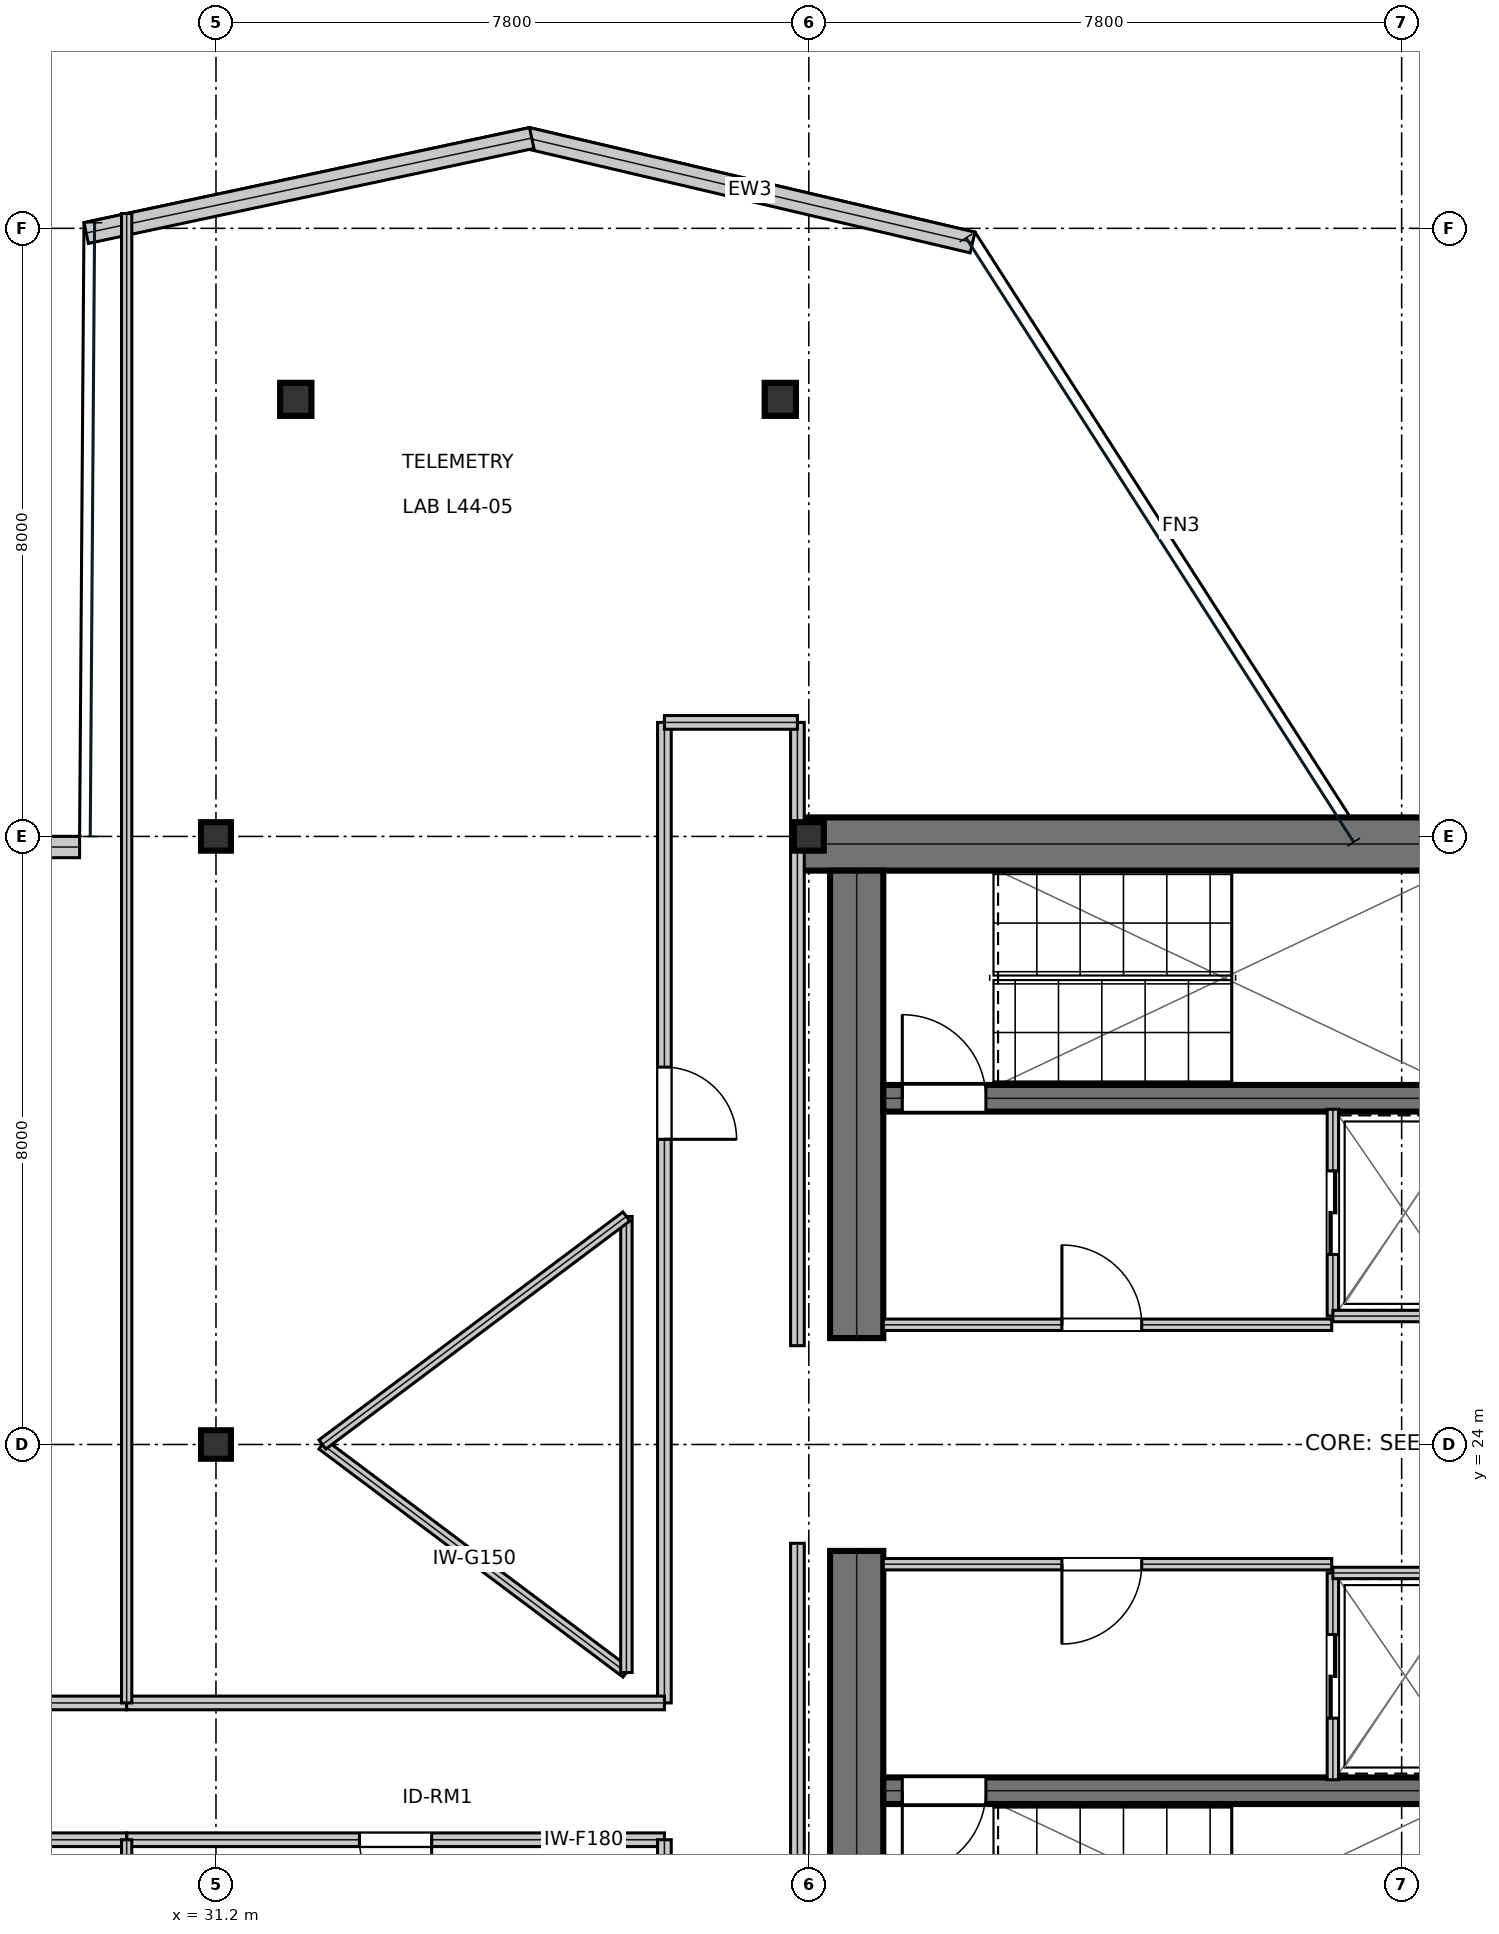
"""IFC4 building model, lengths in metres.
Left out: names, types, materials, properties, quantities, classifications, styles, units other than length and angle.
Written with IfcOpenShell. Run it as: python <this file> out.ifc"""

import sys

from ifc_helpers import new_model, si_unit, direction, frame, frame_2d, origin, origin_2d, place, context, subcontext, project, spatial, rectangle, i_section, extrude, element, fill, save


model = new_model("IFC4")
c1 = context("Model", 3, precision=1e-05, world=origin(), true_north=direction((0.0, 1.0)))
c2 = subcontext(c1, "Body", "Model", "MODEL_VIEW")
j1 = project(units=[si_unit("LENGTHUNIT", "METRE"), si_unit("PLANEANGLEUNIT", "RADIAN")], contexts=[c1])
p1 = place(None, origin())
s1 = spatial("IfcSite", under=j1, at=p1, CompositionType="ELEMENT")
p2 = place(p1, origin())
s2 = spatial("IfcBuilding", under=s1, at=p2, CompositionType="ELEMENT")
p3 = place(p2, frame((0.0, 0.0, 191.85)))
s3 = spatial("IfcBuildingStorey", under=s2, at=p3, CompositionType="ELEMENT", Elevation=191.85)
p4 = place(p3, frame((38.8, 31.9, 0.0), z_axis=(0.0, 0.0, 1.0), x_axis=(1.0, 0.0, 0.0)))
e1 = element("IfcWall", 1, at=p4, inside=s3, PredefinedType="SHEAR", context=c2, shape_type="SweptSolid", body=[
    extrude(rectangle(XDim=16.0, YDim=0.7, at=frame_2d((8.0, 0.0))), origin(), (0.0, 0.0, 1.0), 3.79),
])
for number, where, z_axis, x_axis in (
    (2, (39.63, 16.45, 0.0), (0.0, 0.0, 1.0), (0.0, 1.0, 0.0)),
    (3, (39.63, 25.4, 0.0), (0.0, 0.0, 1.0), (0.0, 1.0, 0.0)),
):
    element("IfcWall", number, at=place(p3, frame(where, z_axis=z_axis, x_axis=x_axis)), inside=s3, PredefinedType="SHEAR", context=c2, shape_type="SweptSolid", body=[
        extrude(rectangle(XDim=6.15, YDim=0.7, at=frame_2d((3.075, 0.0))), origin(), (0.0, 0.0, 1.0), 3.79),
    ])
p5 = place(p3, frame((39.98, 28.555, 0.0), z_axis=(0.0, 0.0, 1.0), x_axis=(1.0, 0.0, 0.0)))
e4 = element("IfcWall", 4, at=p5, inside=s3, PredefinedType="SHEAR", context=c2, shape_type="SweptSolid", body=[
    extrude(rectangle(XDim=7.71, YDim=0.35, at=frame_2d((3.855, 0.0))), origin(), (0.0, 0.0, 1.0), 3.79),
])
p6 = place(p5, frame((0.25, 0.0, 0.0)))
e5 = element("IfcOpeningElement", 5, at=p6, cuts=e4, PredefinedType="OPENING", context=c2, shape_type="SweptSolid", body=[
    extrude(rectangle(XDim=1.1, YDim=2.15, at=frame_2d((0.55, 1.075))), frame((0.0, 0.185, 0.0), z_axis=(0.0, -1.0, 0.0), x_axis=(1.0, 0.0, 0.0)), (0.0, 0.0, 1.0), 0.37),
])
p7 = place(p3, frame((39.98, 19.445, 0.0), z_axis=(0.0, 0.0, 1.0), x_axis=(1.0, 0.0, 0.0)))
e6 = element("IfcWall", 6, at=p7, inside=s3, PredefinedType="SHEAR", context=c2, shape_type="SweptSolid", body=[
    extrude(rectangle(XDim=7.71, YDim=0.35, at=frame_2d((3.855, 0.0))), origin(), (0.0, 0.0, 1.0), 3.79),
])
p8 = place(p7, frame((0.25, 0.0, 0.0)))
e7 = element("IfcOpeningElement", 7, at=p8, cuts=e6, PredefinedType="OPENING", context=c2, shape_type="SweptSolid", body=[
    extrude(rectangle(XDim=1.1, YDim=2.15, at=frame_2d((0.55, 1.075))), frame((0.0, 0.185, 0.0), z_axis=(0.0, -1.0, 0.0), x_axis=(1.0, 0.0, 0.0)), (0.0, 0.0, 1.0), 0.37),
])
for number, where, z_axis, x_axis in (
    (8, (31.2, 24.0, 0.0), (0.0, 0.0, 1.0), (1.0, 0.0, 0.0)),
    (9, (31.2, 32.0, 0.0), (0.0, 0.0, 1.0), (1.0, 0.0, 0.0)),
    (10, (39.0, 32.0, 0.0), (0.0, 0.0, 1.0), (1.0, 0.0, 0.0)),
):
    element("IfcColumn", number, at=place(p3, frame(where, z_axis=z_axis, x_axis=x_axis)), inside=s3, PredefinedType="COLUMN", context=c2, shape_type="SweptSolid", body=[
        extrude(i_section(OverallWidth=0.394, OverallDepth=0.375, WebThickness=0.017, FlangeThickness=0.028, at=origin_2d()), origin(), (0.0, 0.0, 1.0), 4.044),
    ])
for number, where, z_axis, x_axis in (
    (11, (32.25, 37.75, 0.016), (0.0, 0.0, 1.0), (1.0, 0.0, 0.0)),
    (12, (38.625, 37.75, 0.016), (0.0, 0.0, 1.0), (1.0, 0.0, 0.0)),
):
    element("IfcColumn", number, at=place(p3, frame(where, z_axis=z_axis, x_axis=x_axis)), inside=s3, PredefinedType="COLUMN", context=c2, shape_type="SweptSolid", body=[
        extrude(i_section(OverallWidth=0.412, OverallDepth=0.435, WebThickness=0.036, FlangeThickness=0.058, at=origin_2d()), origin(), (0.0, 0.0, 1.0), 4.018),
    ])
p9 = place(p3, frame((41.155, 39.814, 0.0), z_axis=(0.0, 0.0, 1.0), x_axis=(-0.973574347184, 0.228370292517, 0.0)))
e13 = element("IfcWall", 13, at=p9, inside=s3, PredefinedType="STANDARD", context=c2, shape_type="SweptSolid", body=[
    extrude(rectangle(XDim=6.021, YDim=0.28, at=frame_2d((3.01, 0.0))), origin(), (0.0, 0.0, 1.0), 3.79),
])
p10 = place(p3, frame((35.354, 41.188, 0.0), z_axis=(0.0, 0.0, 1.0), x_axis=(-0.978010564176, -0.208555355626, 0.0)))
e14 = element("IfcWall", 14, at=p10, inside=s3, PredefinedType="STANDARD", context=c2, shape_type="SweptSolid", body=[
    extrude(rectangle(XDim=5.994, YDim=0.28, at=frame_2d((2.997, 0.0))), origin(), (0.0, 0.0, 1.0), 3.79),
])
p11 = place(p3, frame((29.406, 31.86, 0.0), z_axis=(0.0, 0.0, 1.0), x_axis=(-1.0, 0.0, 0.0)))
e15 = element("IfcWall", 15, at=p11, inside=s3, PredefinedType="STANDARD", context=c2, shape_type="SweptSolid", body=[
    extrude(rectangle(XDim=2.806, YDim=0.28, at=frame_2d((1.403, 0.0))), origin(), (0.0, 0.0, 1.0), 3.79),
])
p12 = place(p3, frame((39.98, 25.575, 0.0), z_axis=(0.0, 0.0, 1.0), x_axis=(1.0, 0.0, 0.0)))
e16 = element("IfcWall", 16, at=p12, inside=s3, PredefinedType="PARTITIONING", context=c2, shape_type="SweptSolid", body=[
    extrude(rectangle(XDim=5.9, YDim=0.15, at=frame_2d((2.95, 0.0))), origin(), (0.0, 0.0, 1.0), 3.79),
])
p13 = place(p12, frame((2.35, 0.0, 0.0)))
e17 = element("IfcOpeningElement", 17, at=p13, cuts=e16, PredefinedType="OPENING", context=c2, shape_type="SweptSolid", body=[
    extrude(rectangle(XDim=1.05, YDim=2.15, at=frame_2d((0.525, 1.075))), frame((0.0, 0.085, 0.0), z_axis=(0.0, -1.0, 0.0), x_axis=(1.0, 0.0, 0.0)), (0.0, 0.0, 1.0), 0.17),
])
p14 = place(p3, frame((39.98, 22.425, 0.0), z_axis=(0.0, 0.0, 1.0), x_axis=(1.0, 0.0, 0.0)))
e18 = element("IfcWall", 18, at=p14, inside=s3, PredefinedType="PARTITIONING", context=c2, shape_type="SweptSolid", body=[
    extrude(rectangle(XDim=5.9, YDim=0.15, at=frame_2d((2.95, 0.0))), origin(), (0.0, 0.0, 1.0), 3.79),
])
p15 = place(p14, frame((2.35, 0.0, 0.0)))
e19 = element("IfcOpeningElement", 19, at=p15, cuts=e18, PredefinedType="OPENING", context=c2, shape_type="SweptSolid", body=[
    extrude(rectangle(XDim=1.05, YDim=2.15, at=frame_2d((0.525, 1.075))), frame((0.0, 0.085, 0.0), z_axis=(0.0, -1.0, 0.0), x_axis=(1.0, 0.0, 0.0)), (0.0, 0.0, 1.0), 0.17),
])
p16 = place(p3, frame((45.895, 25.69, 0.0), z_axis=(0.0, 0.0, 1.0), x_axis=(0.0, 1.0, 0.0)))
e20 = element("IfcWall", 20, at=p16, inside=s3, PredefinedType="PARTITIONING", context=c2, shape_type="SweptSolid", body=[
    extrude(rectangle(XDim=2.72, YDim=0.15, at=frame_2d((1.36, 0.0))), origin(), (0.0, 0.0, 1.0), 3.79),
])
p17 = place(p16, frame((0.81, 0.0, 0.0)))
e21 = element("IfcOpeningElement", 21, at=p17, cuts=e20, PredefinedType="OPENING", context=c2, shape_type="SweptSolid", body=[
    extrude(rectangle(XDim=1.1, YDim=2.15, at=frame_2d((0.55, 1.075))), frame((0.0, 0.085, 0.0), z_axis=(0.0, -1.0, 0.0), x_axis=(1.0, 0.0, 0.0)), (0.0, 0.0, 1.0), 0.17),
])
p18 = place(p3, frame((45.895, 25.69, 0.0), z_axis=(0.0, 0.0, 1.0), x_axis=(1.0, 0.0, 0.0)))
e22 = element("IfcWall", 22, at=p18, inside=s3, PredefinedType="PARTITIONING", context=c2, shape_type="SweptSolid", body=[
    extrude(rectangle(XDim=1.915, YDim=0.15, at=frame_2d((0.958, 0.0))), origin(), (0.0, 0.0, 1.0), 3.79),
])
p19 = place(p3, frame((45.895, 19.59, 0.0), z_axis=(0.0, 0.0, 1.0), x_axis=(0.0, 1.0, 0.0)))
e23 = element("IfcWall", 23, at=p19, inside=s3, PredefinedType="PARTITIONING", context=c2, shape_type="SweptSolid", body=[
    extrude(rectangle(XDim=2.72, YDim=0.15, at=frame_2d((1.36, 0.0))), origin(), (0.0, 0.0, 1.0), 3.79),
])
p20 = place(p19, frame((0.81, 0.0, 0.0)))
e24 = element("IfcOpeningElement", 24, at=p20, cuts=e23, PredefinedType="OPENING", context=c2, shape_type="SweptSolid", body=[
    extrude(rectangle(XDim=1.1, YDim=2.15, at=frame_2d((0.55, 1.075))), frame((0.0, 0.085, 0.0), z_axis=(0.0, -1.0, 0.0), x_axis=(1.0, 0.0, 0.0)), (0.0, 0.0, 1.0), 0.17),
])
p21 = place(p3, frame((45.895, 22.31, 0.0), z_axis=(0.0, 0.0, 1.0), x_axis=(1.0, 0.0, 0.0)))
e25 = element("IfcWall", 25, at=p21, inside=s3, PredefinedType="PARTITIONING", context=c2, shape_type="SweptSolid", body=[
    extrude(rectangle(XDim=1.915, YDim=0.15, at=frame_2d((0.958, 0.0))), origin(), (0.0, 0.0, 1.0), 3.79),
])
p22 = place(p3, frame((30.025, 18.8, 0.0), z_axis=(0.0, 0.0, 1.0), x_axis=(1.0, 0.0, 0.0)))
e26 = element("IfcWall", 26, at=p22, inside=s3, PredefinedType="SOLIDWALL", context=c2, shape_type="SweptSolid", body=[
    extrude(rectangle(XDim=7.075, YDim=0.18, at=frame_2d((3.538, 0.0))), origin(), (0.0, 0.0, 1.0), 3.241),
])
p23 = place(p22, frame((3.062, 0.0, 0.0)))
e27 = element("IfcOpeningElement", 27, at=p23, cuts=e26, PredefinedType="OPENING", context=c2, shape_type="SweptSolid", body=[
    extrude(rectangle(XDim=0.95, YDim=2.15, at=frame_2d((0.475, 1.075))), frame((0.0, 0.1, 0.0), z_axis=(0.0, -1.0, 0.0), x_axis=(1.0, 0.0, 0.0)), (0.0, 0.0, 1.0), 0.2),
])
p24 = place(p3, frame((26.4, 18.8, 0.0), z_axis=(0.0, 0.0, 1.0), x_axis=(1.0, 0.0, 0.0)))
e28 = element("IfcWall", 28, at=p24, inside=s3, PredefinedType="SOLIDWALL", context=c2, shape_type="SweptSolid", body=[
    extrude(rectangle(XDim=3.625, YDim=0.18, at=frame_2d((1.812, 0.0))), origin(), (0.0, 0.0, 1.0), 3.79),
])
p25 = place(p24, frame((1.337, 0.0, 0.0)))
e29 = element("IfcOpeningElement", 29, at=p25, cuts=e28, PredefinedType="OPENING", context=c2, shape_type="SweptSolid", body=[
    extrude(rectangle(XDim=0.95, YDim=2.15, at=frame_2d((0.475, 1.075))), frame((0.0, 0.1, 0.0), z_axis=(0.0, -1.0, 0.0), x_axis=(1.0, 0.0, 0.0)), (0.0, 0.0, 1.0), 0.2),
])
p26 = place(p3, frame((37.1, 20.6, 0.0), z_axis=(0.0, 0.0, 1.0), x_axis=(0.0, 1.0, 0.0)))
e30 = element("IfcWall", 30, at=p26, inside=s3, PredefinedType="SOLIDWALL", context=c2, shape_type="SweptSolid", body=[
    extrude(rectangle(XDim=12.9, YDim=0.18, at=frame_2d((6.45, 0.0))), origin(), (0.0, 0.0, 1.0), 3.241),
])
p27 = place(p26, frame((7.415, 0.0, 0.0)))
e31 = element("IfcOpeningElement", 31, at=p27, cuts=e30, PredefinedType="OPENING", context=c2, shape_type="SweptSolid", body=[
    extrude(rectangle(XDim=0.95, YDim=2.15, at=frame_2d((0.475, 1.075))), frame((0.0, 0.1, 0.0), z_axis=(0.0, -1.0, 0.0), x_axis=(1.0, 0.0, 0.0)), (0.0, 0.0, 1.0), 0.2),
])
p28 = place(p3, frame((38.85, 14.5, 0.0), z_axis=(0.0, 0.0, 1.0), x_axis=(0.0, 1.0, 0.0)))
e32 = element("IfcWall", 32, at=p28, inside=s3, PredefinedType="SOLIDWALL", context=c2, shape_type="SweptSolid", body=[
    extrude(rectangle(XDim=8.2, YDim=0.18, at=frame_2d((4.1, 0.0))), origin(), (0.0, 0.0, 1.0), 3.241),
])
p29 = place(p3, frame((37.1, 14.5, 0.0), z_axis=(0.0, 0.0, 1.0), x_axis=(0.0, 1.0, 0.0)))
e33 = element("IfcWall", 33, at=p29, inside=s3, PredefinedType="SOLIDWALL", context=c2, shape_type="SweptSolid", body=[
    extrude(rectangle(XDim=4.3, YDim=0.18, at=frame_2d((2.15, 0.0))), origin(), (0.0, 0.0, 1.0), 3.241),
])
p30 = place(p3, frame((26.4, 20.6, 0.0), z_axis=(0.0, 0.0, 1.0), x_axis=(1.0, 0.0, 0.0)))
e34 = element("IfcWall", 34, at=p30, inside=s3, PredefinedType="SOLIDWALL", context=c2, shape_type="SweptSolid", body=[
    extrude(rectangle(XDim=3.625, YDim=0.18, at=frame_2d((1.812, 0.0))), origin(), (0.0, 0.0, 1.0), 3.79),
])
p31 = place(p3, frame((38.85, 25.3, 0.0), z_axis=(0.0, 0.0, 1.0), x_axis=(0.0, 1.0, 0.0)))
e35 = element("IfcWall", 35, at=p31, inside=s3, PredefinedType="SOLIDWALL", context=c2, shape_type="SweptSolid", body=[
    extrude(rectangle(XDim=8.2, YDim=0.18, at=frame_2d((4.1, 0.0))), origin(), (0.0, 0.0, 1.0), 3.241),
])
p32 = place(p3, frame((30.025, 20.6, 0.0), z_axis=(0.0, 0.0, 1.0), x_axis=(1.0, 0.0, 0.0)))
e36 = element("IfcWall", 36, at=p32, inside=s3, PredefinedType="SOLIDWALL", context=c2, shape_type="SweptSolid", body=[
    extrude(rectangle(XDim=7.075, YDim=0.18, at=frame_2d((3.538, 0.0))), origin(), (0.0, 0.0, 1.0), 3.241),
])
p33 = place(p3, frame((37.1, 33.5, 0.0), z_axis=(0.0, 0.0, 1.0), x_axis=(1.0, 0.0, 0.0)))
e37 = element("IfcWall", 37, at=p33, inside=s3, PredefinedType="SOLIDWALL", context=c2, shape_type="SweptSolid", body=[
    extrude(rectangle(XDim=1.75, YDim=0.18, at=frame_2d((0.875, 0.0))), origin(), (0.0, 0.0, 1.0), 3.241),
])
p34 = place(p3, frame((30.025, 7.805, 0.0), z_axis=(0.0, 0.0, 1.0), x_axis=(0.0, 1.0, 0.0)))
e38 = element("IfcWall", 38, at=p34, inside=s3, PredefinedType="PARTITIONING", context=c2, shape_type="SweptSolid", body=[
    extrude(rectangle(XDim=10.995, YDim=0.135, at=frame_2d((5.498, 0.0))), origin(), (0.0, 0.0, 1.0), 3.319),
])
p35 = place(p3, frame((30.025, 20.6, 0.0), z_axis=(0.0, 0.0, 1.0), x_axis=(0.0, 1.0, 0.0)))
e39 = element("IfcWall", 39, at=p35, inside=s3, PredefinedType="PARTITIONING", context=c2, shape_type="SweptSolid", body=[
    extrude(rectangle(XDim=19.595, YDim=0.135, at=frame_2d((9.797, 0.0))), origin(), (0.0, 0.0, 1.0), 3.241),
])
p36 = place(p3, frame((32.6, 24.0, 0.0), z_axis=(0.0, 0.0, 1.0), x_axis=(0.8, -0.6, 0.0)))
e40 = element("IfcWall", 40, at=p36, inside=s3, PredefinedType="MOVABLE", context=c2, shape_type="SweptSolid", body=[
    extrude(rectangle(XDim=5.0, YDim=0.15, at=frame_2d((2.5, 0.0))), origin(), (0.0, 0.0, 1.0), 3.79),
])
p37 = place(p3, frame((36.6, 21.0, 0.0), z_axis=(0.0, 0.0, 1.0), x_axis=(0.0, 1.0, 0.0)))
e41 = element("IfcWall", 41, at=p37, inside=s3, PredefinedType="MOVABLE", context=c2, shape_type="SweptSolid", body=[
    extrude(rectangle(XDim=6.0, YDim=0.15, at=frame_2d((3.0, 0.0))), origin(), (0.0, 0.0, 1.0), 3.79),
])
p38 = place(p3, frame((36.6, 27.0, 0.0), z_axis=(0.0, 0.0, 1.0), x_axis=(-0.8, -0.6, 0.0)))
e42 = element("IfcWall", 42, at=p38, inside=s3, PredefinedType="MOVABLE", context=c2, shape_type="SweptSolid", body=[
    extrude(rectangle(XDim=5.0, YDim=0.15, at=frame_2d((2.5, 0.0))), origin(), (0.0, 0.0, 1.0), 3.79),
])
p39 = place(p13, origin())
e43 = element("IfcDoor", 43, at=p39, inside=s3, OperationType="SINGLE_SWING_LEFT", PredefinedType="DOOR", context=c2, shape_type="SweptSolid", body=[
    extrude(rectangle(XDim=1.05, YDim=2.15, at=frame_2d((0.525, 1.075))), frame((0.0, 0.025, 0.0), z_axis=(0.0, -1.0, 0.0), x_axis=(1.0, 0.0, 0.0)), (0.0, 0.0, 1.0), 0.05),
])
fill(e17, e43)
p40 = place(p15, frame((1.05, 0.0, 0.0), z_axis=(0.0, 0.0, 1.0), x_axis=(-1.0, 0.0, 0.0)))
e44 = element("IfcDoor", 44, at=p40, inside=s3, OperationType="SINGLE_SWING_RIGHT", PredefinedType="DOOR", context=c2, shape_type="SweptSolid", body=[
    extrude(rectangle(XDim=1.05, YDim=2.15, at=frame_2d((0.525, 1.075))), frame((0.0, 0.025, 0.0), z_axis=(0.0, -1.0, 0.0), x_axis=(1.0, 0.0, 0.0)), (0.0, 0.0, 1.0), 0.05),
])
fill(e19, e44)
p41 = place(p17, frame((1.1, 0.0, 0.0), z_axis=(0.0, 0.0, 1.0), x_axis=(-1.0, 0.0, 0.0)))
e45 = element("IfcDoor", 45, at=p41, inside=s3, OperationType="DOUBLE_DOOR_SLIDING", PredefinedType="DOOR", context=c2, shape_type="SweptSolid", body=[
    extrude(rectangle(XDim=1.1, YDim=2.15, at=frame_2d((0.55, 1.075))), frame((0.0, 0.025, 0.0), z_axis=(0.0, -1.0, 0.0), x_axis=(1.0, 0.0, 0.0)), (0.0, 0.0, 1.0), 0.05),
])
fill(e21, e45)
p42 = place(p20, frame((1.1, 0.0, 0.0), z_axis=(0.0, 0.0, 1.0), x_axis=(-1.0, 0.0, 0.0)))
e46 = element("IfcDoor", 46, at=p42, inside=s3, OperationType="DOUBLE_DOOR_SLIDING", PredefinedType="DOOR", context=c2, shape_type="SweptSolid", body=[
    extrude(rectangle(XDim=1.1, YDim=2.15, at=frame_2d((0.55, 1.075))), frame((0.0, 0.025, 0.0), z_axis=(0.0, -1.0, 0.0), x_axis=(1.0, 0.0, 0.0)), (0.0, 0.0, 1.0), 0.05),
])
fill(e24, e46)
p43 = place(p23, frame((0.95, 0.0, 0.0), z_axis=(0.0, 0.0, 1.0), x_axis=(-1.0, 0.0, 0.0)))
e47 = element("IfcDoor", 47, at=p43, inside=s3, OperationType="SINGLE_SWING_LEFT", PredefinedType="DOOR", context=c2, shape_type="SweptSolid", body=[
    extrude(rectangle(XDim=0.95, YDim=2.15, at=frame_2d((0.475, 1.075))), frame((0.0, 0.025, 0.0), z_axis=(0.0, -1.0, 0.0), x_axis=(1.0, 0.0, 0.0)), (0.0, 0.0, 1.0), 0.05),
])
fill(e27, e47)
p44 = place(p27, frame((0.95, 0.0, 0.0), z_axis=(0.0, 0.0, 1.0), x_axis=(-1.0, 0.0, 0.0)))
e48 = element("IfcDoor", 48, at=p44, inside=s3, OperationType="SINGLE_SWING_RIGHT", PredefinedType="DOOR", context=c2, shape_type="SweptSolid", body=[
    extrude(rectangle(XDim=0.95, YDim=2.15, at=frame_2d((0.475, 1.075))), frame((0.0, 0.025, 0.0), z_axis=(0.0, -1.0, 0.0), x_axis=(1.0, 0.0, 0.0)), (0.0, 0.0, 1.0), 0.05),
])
fill(e31, e48)
p45 = place(p6, origin())
e49 = element("IfcDoor", 49, at=p45, inside=s3, OperationType="SINGLE_SWING_LEFT", PredefinedType="DOOR", context=c2, shape_type="SweptSolid", body=[
    extrude(rectangle(XDim=1.1, YDim=2.15, at=frame_2d((0.55, 1.075))), frame((0.0, 0.025, 0.0), z_axis=(0.0, -1.0, 0.0), x_axis=(1.0, 0.0, 0.0)), (0.0, 0.0, 1.0), 0.05),
])
fill(e5, e49)
p46 = place(p8, frame((1.1, 0.0, 0.0), z_axis=(0.0, 0.0, 1.0), x_axis=(-1.0, 0.0, 0.0)))
e50 = element("IfcDoor", 50, at=p46, inside=s3, OperationType="SINGLE_SWING_RIGHT", PredefinedType="DOOR", context=c2, shape_type="SweptSolid", body=[
    extrude(rectangle(XDim=1.1, YDim=2.15, at=frame_2d((0.55, 1.075))), frame((0.0, 0.025, 0.0), z_axis=(0.0, -1.0, 0.0), x_axis=(1.0, 0.0, 0.0)), (0.0, 0.0, 1.0), 0.05),
])
fill(e7, e50)
save(model, sys.argv[1])
